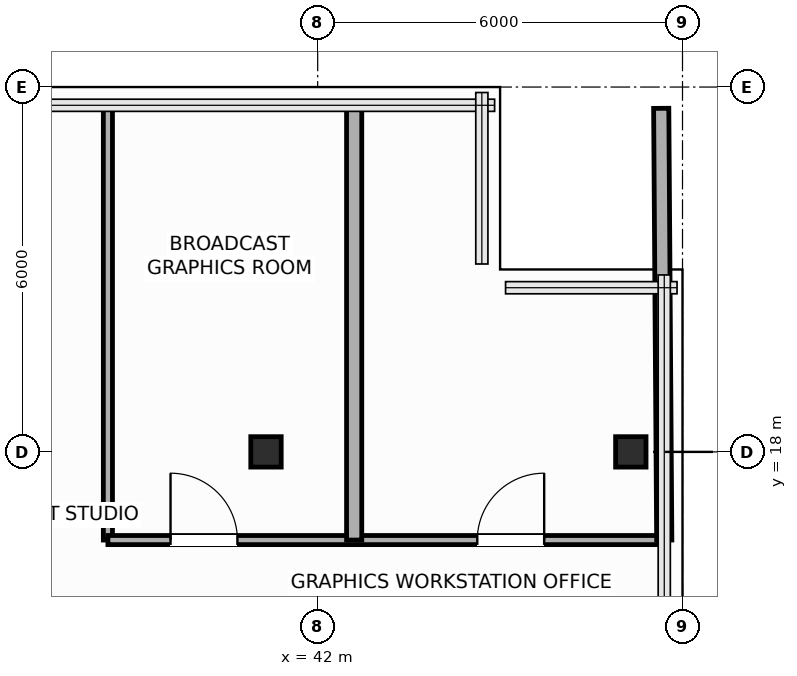
"""IFC4 building model, lengths in metres.
Left out: names, types, materials, properties, quantities, classifications, styles, units other than length and angle.
Written with IfcOpenShell. Run it as: python <this file> out.ifc"""

import sys

from ifc_helpers import new_model, si_unit, direction, frame, frame_2d, origin, origin_2d, place, context, subcontext, project, spatial, rectangle, hollow_rectangle, extrude, element, fill, save


model = new_model("IFC4")
c1 = context("Model", 3, precision=1e-05, world=origin(), true_north=direction((0.0, 1.0)))
c2 = subcontext(c1, "Body", "Model", "MODEL_VIEW")
j1 = project(units=[si_unit("LENGTHUNIT", "METRE"), si_unit("PLANEANGLEUNIT", "RADIAN")], contexts=[c1])
p1 = place(None, origin())
s1 = spatial("IfcSite", under=j1, at=p1, CompositionType="ELEMENT")
p2 = place(p1, origin())
s2 = spatial("IfcBuilding", under=s1, at=p2, CompositionType="ELEMENT")
p3 = place(p2, frame((0.0, 0.0, 126.9)))
s3 = spatial("IfcBuildingStorey", under=s2, at=p3, CompositionType="ELEMENT", Elevation=126.9)
for number, where, z_axis, x_axis in (
    (1, (41.15, 18.0, 0.0), (0.0, 0.0, 1.0), (1.0, 0.0, 0.0)),
    (2, (47.15, 18.0, 0.0), (0.0, 0.0, 1.0), (1.0, 0.0, 0.0)),
):
    element("IfcColumn", number, at=place(p3, frame(where, z_axis=z_axis, x_axis=x_axis)), inside=s3, PredefinedType="COLUMN", context=c2, shape_type="SweptSolid", body=[
        extrude(hollow_rectangle(XDim=0.5, YDim=0.5, WallThickness=0.025, InnerFilletRadius=0.025, OuterFilletRadius=0.04, at=origin_2d()), origin(), (0.0, 0.0, 1.0), 3.75),
    ])
p4 = place(p3, frame((38.55, 23.7, 0.0), z_axis=(0.0, 0.0, 1.0), x_axis=(0.0, -1.0, 0.0)))
e3 = element("IfcWall", 3, at=p4, inside=s3, PredefinedType="PARTITIONING", context=c2, shape_type="SweptSolid", body=[
    extrude(rectangle(XDim=7.15, YDim=0.15, at=frame_2d((3.575, 0.0))), origin(), (0.0, 0.0, 1.0), 3.525),
])
p5 = place(p3, frame((38.55, 16.55, 0.0), z_axis=(0.0, 0.0, 1.0), x_axis=(1.0, 0.0, 0.0)))
e4 = element("IfcWall", 4, at=p5, inside=s3, PredefinedType="PARTITIONING", context=c2, shape_type="SweptSolid", body=[
    extrude(rectangle(XDim=9.15, YDim=0.15, at=frame_2d((4.575, 0.0))), origin(), (0.0, 0.0, 1.0), 3.525),
])
p6 = place(p5, frame((1.03, 0.0, 0.0)))
e5 = element("IfcOpeningElement", 5, at=p6, cuts=e4, PredefinedType="OPENING", context=c2, shape_type="SweptSolid", body=[
    extrude(rectangle(XDim=1.1, YDim=2.25, at=frame_2d((0.55, 1.125))), frame((0.0, 0.085, 0.0), z_axis=(0.0, -1.0, 0.0), x_axis=(1.0, 0.0, 0.0)), (0.0, 0.0, 1.0), 0.17),
])
p7 = place(p5, frame((6.075, 0.0, 0.0)))
e6 = element("IfcOpeningElement", 6, at=p7, cuts=e4, PredefinedType="OPENING", context=c2, shape_type="SweptSolid", body=[
    extrude(rectangle(XDim=1.1, YDim=2.25, at=frame_2d((0.55, 1.125))), frame((0.0, 0.085, 0.0), z_axis=(0.0, -1.0, 0.0), x_axis=(1.0, 0.0, 0.0)), (0.0, 0.0, 1.0), 0.17),
])
p8 = place(p3, frame((42.6, 16.55, 0.0), z_axis=(0.0, 0.0, 1.0), x_axis=(0.0, 1.0, 0.0)))
e7 = element("IfcWall", 7, at=p8, inside=s3, PredefinedType="PARTITIONING", context=c2, shape_type="SweptSolid", body=[
    extrude(rectangle(XDim=7.15, YDim=0.25, at=frame_2d((3.575, 0.0))), origin(), (0.0, 0.0, 1.0), 3.525),
])
p9 = place(p3, frame((47.7, 16.55, 0.0), z_axis=(0.0, 0.0, 1.0), x_axis=(-0.007049101019, 0.999975154779, 0.0)))
e8 = element("IfcWall", 8, at=p9, inside=s3, PredefinedType="PARTITIONING", context=c2, shape_type="SweptSolid", body=[
    extrude(rectangle(XDim=7.1, YDim=0.25, at=frame_2d((3.55, 0.0))), origin(), (0.0, 0.0, 1.0), 3.525),
])
p10 = place(p6, origin())
e9 = element("IfcDoor", 9, at=p10, inside=s3, OperationType="SINGLE_SWING_LEFT", PredefinedType="DOOR", context=c2, shape_type="SweptSolid", body=[
    extrude(rectangle(XDim=1.1, YDim=2.25, at=frame_2d((0.55, 1.125))), frame((0.0, 0.025, 0.0), z_axis=(0.0, -1.0, 0.0), x_axis=(1.0, 0.0, 0.0)), (0.0, 0.0, 1.0), 0.05),
])
fill(e5, e9)
p11 = place(p7, origin())
e10 = element("IfcDoor", 10, at=p11, inside=s3, OperationType="SINGLE_SWING_RIGHT", PredefinedType="DOOR", context=c2, shape_type="SweptSolid", body=[
    extrude(rectangle(XDim=1.1, YDim=2.25, at=frame_2d((0.55, 1.125))), frame((0.0, 0.025, 0.0), z_axis=(0.0, -1.0, 0.0), x_axis=(1.0, 0.0, 0.0)), (0.0, 0.0, 1.0), 0.05),
])
fill(e6, e10)
save(model, sys.argv[1])
